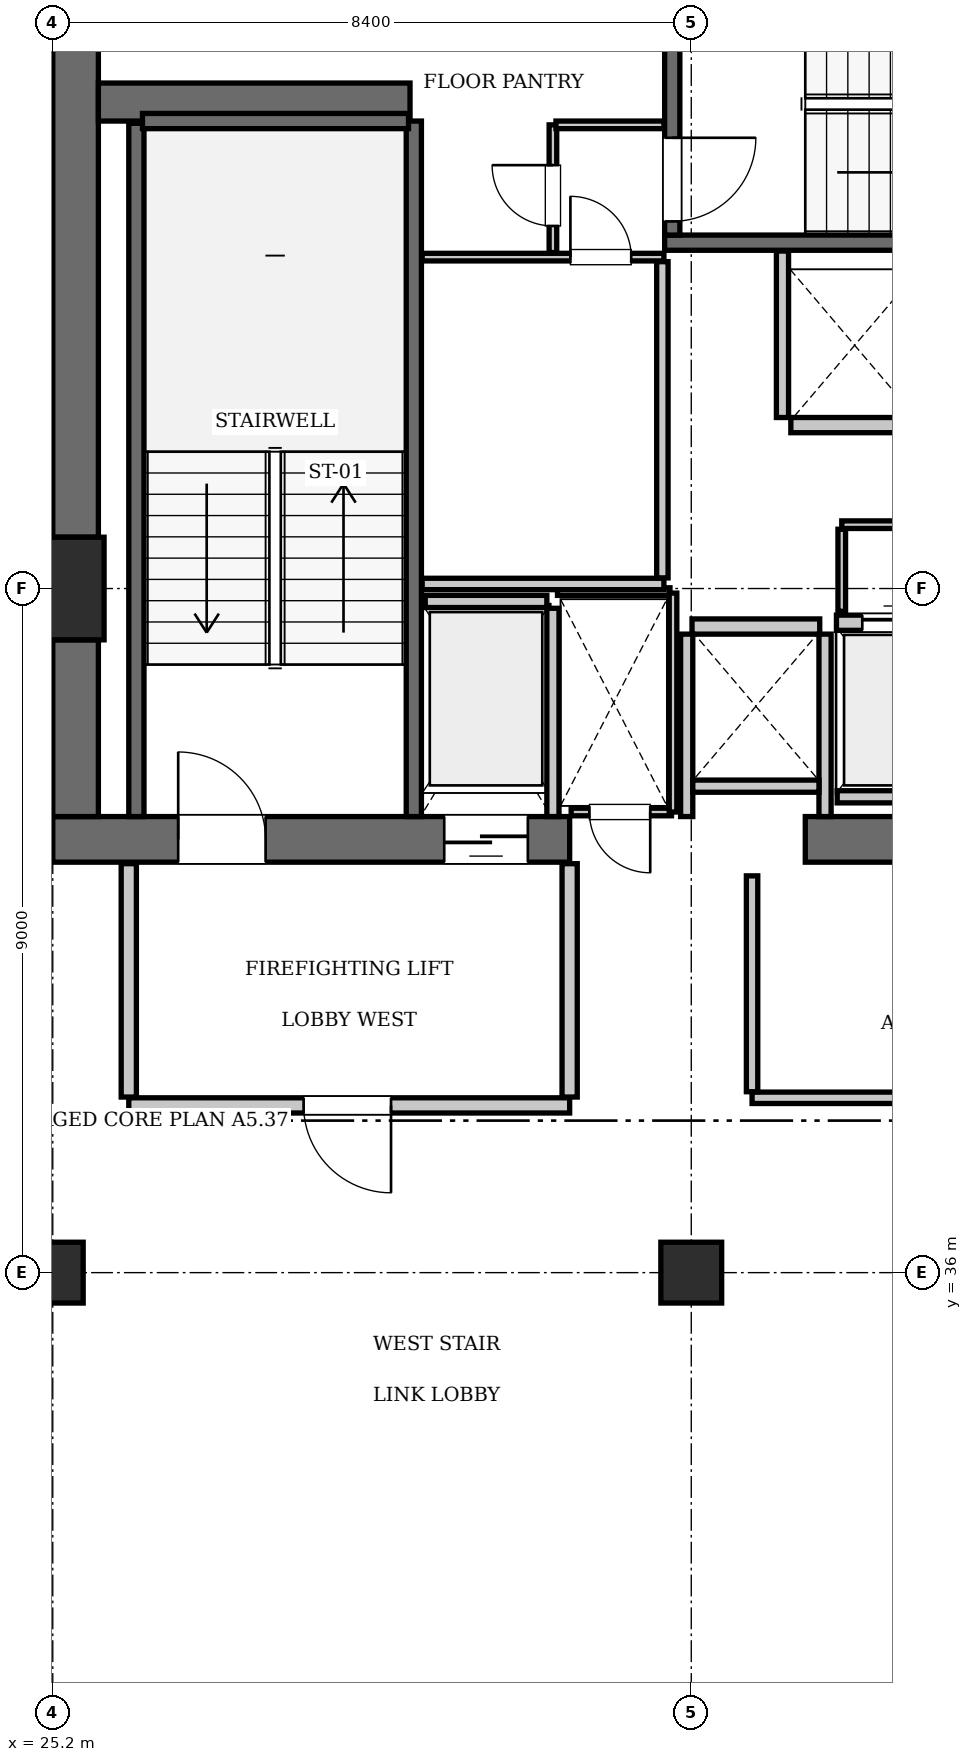
"""IFC4 building model, lengths in metres.
Left out: names, types, materials, properties, quantities, classifications, styles, units other than length and angle.
Written with IfcOpenShell. Run it as: python <this file> out.ifc"""

import sys

from ifc_helpers import new_model, si_unit, direction, frame, frame_2d, origin, origin_2d, place, context, subcontext, project, spatial, rectangle, extrude, element, fill, save


model = new_model("IFC4")
c1 = context("Model", 3, precision=1e-05, world=origin(), true_north=direction((0.0, 1.0)))
c2 = subcontext(c1, "Body", "Model", "MODEL_VIEW")
j1 = project(units=[si_unit("LENGTHUNIT", "METRE"), si_unit("PLANEANGLEUNIT", "RADIAN")], contexts=[c1])
p1 = place(None, origin())
s1 = spatial("IfcSite", under=j1, at=p1, CompositionType="ELEMENT")
p2 = place(p1, origin())
s2 = spatial("IfcBuilding", under=s1, at=p2, CompositionType="ELEMENT")
p3 = place(p2, frame((0.0, 0.0, 341.25)))
s3 = spatial("IfcBuildingStorey", under=s2, at=p3, CompositionType="ELEMENT", Elevation=341.25)
p4 = place(p3, frame((25.2, 45.0, 0.0), z_axis=(0.0, 0.0, 1.0), x_axis=(1.0, 0.0, 0.0)))
e1 = element("IfcColumn", 1, at=p4, inside=s3, PredefinedType="COLUMN", context=c2, shape_type="SweptSolid", body=[
    extrude(rectangle(XDim=1.35, YDim=1.35, at=origin_2d()), origin(), (0.0, 0.0, 1.0), 3.85),
])
p5 = place(p3, frame((25.2, 41.7, 0.0), z_axis=(0.0, 0.0, 1.0), x_axis=(1.0, 0.0, 0.0)))
e2 = element("IfcWall", 2, at=p5, inside=s3, PredefinedType="SHEAR", context=c2, shape_type="SweptSolid", body=[
    extrude(rectangle(XDim=6.8, YDim=0.6, at=frame_2d((3.4, 0.0))), origin(), (0.0, 0.0, 1.0), 3.85),
])
p6 = place(p5, frame((1.65, 0.0, 0.0)))
e3 = element("IfcOpeningElement", 3, at=p6, cuts=e2, PredefinedType="OPENING", context=c2, shape_type="SweptSolid", body=[
    extrude(rectangle(XDim=1.15, YDim=2.15, at=frame_2d((0.575, 1.075))), frame((0.0, 0.31, 0.0), z_axis=(0.0, -1.0, 0.0), x_axis=(1.0, 0.0, 0.0)), (0.0, 0.0, 1.0), 0.62),
])
p7 = place(p5, frame((5.15, 0.0, 0.0)))
e4 = element("IfcOpeningElement", 4, at=p7, cuts=e2, PredefinedType="OPENING", context=c2, shape_type="SweptSolid", body=[
    extrude(rectangle(XDim=1.1, YDim=2.2, at=frame_2d((0.55, 1.1))), frame((0.0, 0.31, 0.0), z_axis=(0.0, -1.0, 0.0), x_axis=(1.0, 0.0, 0.0)), (0.0, 0.0, 1.0), 0.62),
])
p8 = place(p3, frame((35.1, 41.7, 0.0), z_axis=(0.0, 0.0, 1.0), x_axis=(1.0, 0.0, 0.0)))
e5 = element("IfcWall", 5, at=p8, inside=s3, PredefinedType="SHEAR", context=c2, shape_type="SweptSolid", body=[
    extrude(rectangle(XDim=5.4, YDim=0.6, at=frame_2d((2.7, 0.0))), origin(), (0.0, 0.0, 1.0), 3.85),
])
p9 = place(p3, frame((25.5, 42.0, 0.0), z_axis=(0.0, 0.0, 1.0), x_axis=(0.0, 1.0, 0.0)))
e6 = element("IfcWall", 6, at=p9, inside=s3, PredefinedType="SHEAR", context=c2, shape_type="SweptSolid", body=[
    extrude(rectangle(XDim=2.325, YDim=0.6, at=frame_2d((1.163, 0.0))), origin(), (0.0, 0.0, 1.0), 3.85),
])
p10 = place(p3, frame((25.5, 45.675, 0.0), z_axis=(0.0, 0.0, 1.0), x_axis=(0.0, 1.0, 0.0)))
e7 = element("IfcWall", 7, at=p10, inside=s3, PredefinedType="SHEAR", context=c2, shape_type="SweptSolid", body=[
    extrude(rectangle(XDim=7.725, YDim=0.6, at=frame_2d((3.862, 0.0))), origin(), (0.0, 0.0, 1.0), 3.85),
])
p11 = place(p3, frame((25.8, 51.4, 0.0), z_axis=(0.0, 0.0, 1.0), x_axis=(1.0, 0.0, 0.0)))
e8 = element("IfcWall", 8, at=p11, inside=s3, PredefinedType="SHEAR", context=c2, shape_type="SweptSolid", body=[
    extrude(rectangle(XDim=4.1, YDim=0.5, at=frame_2d((2.05, 0.0))), origin(), (0.0, 0.0, 1.0), 3.85),
])
for number, where, z_axis, x_axis in (
    (9, (25.2, 36.0, 0.0), (0.0, 0.0, 1.0), (1.0, 0.0, 0.0)),
    (10, (33.6, 36.0, 0.0), (0.0, 0.0, 1.0), (1.0, 0.0, 0.0)),
):
    element("IfcColumn", number, at=place(p3, frame(where, z_axis=z_axis, x_axis=x_axis)), inside=s3, PredefinedType="COLUMN", context=c2, shape_type="SweptSolid", body=[
        extrude(rectangle(XDim=0.8, YDim=0.8, at=origin_2d()), origin(), (0.0, 0.0, 1.0), 3.85),
    ])
p12 = place(p3, frame((29.95, 42.0, 0.0), z_axis=(0.0, 0.0, 1.0), x_axis=(0.0, 1.0, 0.0)))
e11 = element("IfcWall", 11, at=p12, inside=s3, PredefinedType="SOLIDWALL", context=c2, shape_type="SweptSolid", body=[
    extrude(rectangle(XDim=9.15, YDim=0.2, at=frame_2d((4.575, 0.0))), origin(), (0.0, 0.0, 1.0), 3.61),
])
p13 = place(p3, frame((26.3, 42.0, 0.0), z_axis=(0.0, 0.0, 1.0), x_axis=(0.0, 1.0, 0.0)))
e12 = element("IfcWall", 12, at=p13, inside=s3, PredefinedType="SOLIDWALL", context=c2, shape_type="SweptSolid", body=[
    extrude(rectangle(XDim=9.12, YDim=0.2, at=frame_2d((4.56, 0.0))), origin(), (0.0, 0.0, 1.0), 3.61),
])
p14 = place(p3, frame((26.38, 51.15, 0.0), z_axis=(0.0, 0.0, 1.0), x_axis=(1.0, 0.0, 0.0)))
e13 = element("IfcWall", 13, at=p14, inside=s3, PredefinedType="SOLIDWALL", context=c2, shape_type="SweptSolid", body=[
    extrude(rectangle(XDim=3.5, YDim=0.2, at=frame_2d((1.75, 0.0))), origin(), (0.0, 0.0, 1.0), 3.61),
])
p15 = place(p3, frame((33.25, 49.55, 0.0), z_axis=(0.0, 0.0, 1.0), x_axis=(1.0, 0.0, 0.0)))
e14 = element("IfcWall", 14, at=p15, inside=s3, PredefinedType="SOLIDWALL", context=c2, shape_type="SweptSolid", body=[
    extrude(rectangle(XDim=9.1, YDim=0.2, at=frame_2d((4.55, 0.0))), origin(), (0.0, 0.0, 1.0), 3.61),
])
p16 = place(p3, frame((33.35, 49.65, 0.0), z_axis=(0.0, 0.0, 1.0), x_axis=(0.0, 1.0, 0.0)))
e15 = element("IfcWall", 15, at=p16, inside=s3, PredefinedType="SOLIDWALL", context=c2, shape_type="SweptSolid", body=[
    extrude(rectangle(XDim=3.75, YDim=0.2, at=frame_2d((1.875, 0.0))), origin(), (0.0, 0.0, 1.0), 3.61),
])
p17 = place(p16, frame((0.18, 0.0, 0.0)))
e16 = element("IfcOpeningElement", 16, at=p17, cuts=e15, PredefinedType="OPENING", context=c2, shape_type="SweptSolid", body=[
    extrude(rectangle(XDim=1.1, YDim=2.15, at=frame_2d((0.55, 1.075))), frame((0.0, 0.11, 0.0), z_axis=(0.0, -1.0, 0.0), x_axis=(1.0, 0.0, 0.0)), (0.0, 0.0, 1.0), 0.22),
])
p18 = place(p3, frame((35.51, 44.55, 0.0), z_axis=(0.0, 0.0, 1.0), x_axis=(1.0, 0.0, 0.0)))
e17 = element("IfcWall", 17, at=p18, inside=s3, PredefinedType="SOLIDWALL", context=c2, shape_type="SweptSolid", body=[
    extrude(rectangle(XDim=1.68, YDim=0.2, at=frame_2d((0.84, 0.0))), origin(), (0.0, 0.0, 1.0), 3.61),
])
p19 = place(p18, frame((0.34, 0.0, 0.0)))
e18 = element("IfcOpeningElement", 18, at=p19, cuts=e17, PredefinedType="OPENING", context=c2, shape_type="SweptSolid", body=[
    extrude(rectangle(XDim=1.0, YDim=2.15, at=frame_2d((0.5, 1.075))), frame((0.0, 0.11, 0.0), z_axis=(0.0, -1.0, 0.0), x_axis=(1.0, 0.0, 0.0)), (0.0, 0.0, 1.0), 0.22),
])
p20 = place(p3, frame((34.91, 47.15, 0.0), z_axis=(0.0, 0.0, 1.0), x_axis=(1.0, 0.0, 0.0)))
e19 = element("IfcWall", 19, at=p20, inside=s3, PredefinedType="SOLIDWALL", context=c2, shape_type="SweptSolid", body=[
    extrude(rectangle(XDim=1.68, YDim=0.2, at=frame_2d((0.84, 0.0))), origin(), (0.0, 0.0, 1.0), 3.61),
])
p21 = place(p3, frame((33.61, 44.5, 0.0), z_axis=(0.0, 0.0, 1.0), x_axis=(1.0, 0.0, 0.0)))
e20 = element("IfcWall", 20, at=p21, inside=s3, PredefinedType="SOLIDWALL", context=c2, shape_type="SweptSolid", body=[
    extrude(rectangle(XDim=1.68, YDim=0.2, at=frame_2d((0.84, 0.0))), origin(), (0.0, 0.0, 1.0), 3.61),
])
p22 = place(p3, frame((30.1, 44.83, 0.0), z_axis=(0.0, 0.0, 1.0), x_axis=(1.0, 0.0, 0.0)))
e21 = element("IfcWall", 21, at=p22, inside=s3, PredefinedType="SOLIDWALL", context=c2, shape_type="SweptSolid", body=[
    extrude(rectangle(XDim=1.6, YDim=0.16, at=frame_2d((0.8, 0.0))), origin(), (0.0, 0.0, 1.0), 3.61),
])
p23 = place(p3, frame((31.78, 42.0, 0.0), z_axis=(0.0, 0.0, 1.0), x_axis=(0.0, 1.0, 0.0)))
e22 = element("IfcWall", 22, at=p23, inside=s3, PredefinedType="SOLIDWALL", context=c2, shape_type="SweptSolid", body=[
    extrude(rectangle(XDim=2.74, YDim=0.16, at=frame_2d((1.37, 0.0))), origin(), (0.0, 0.0, 1.0), 3.61),
])
p24 = place(p3, frame((35.52, 42.26, 0.0), z_axis=(0.0, 0.0, 1.0), x_axis=(1.0, 0.0, 0.0)))
e23 = element("IfcWall", 23, at=p24, inside=s3, PredefinedType="SOLIDWALL", context=c2, shape_type="SweptSolid", body=[
    extrude(rectangle(XDim=5.02, YDim=0.16, at=frame_2d((2.51, 0.0))), origin(), (0.0, 0.0, 1.0), 3.61),
])
p25 = place(p3, frame((34.8, 47.25, 0.0), z_axis=(0.0, 0.0, 1.0), x_axis=(0.0, 1.0, 0.0)))
e24 = element("IfcWall", 24, at=p25, inside=s3, PredefinedType="SOLIDWALL", context=c2, shape_type="SweptSolid", body=[
    extrude(rectangle(XDim=2.19, YDim=0.16, at=frame_2d((1.095, 0.0))), origin(), (0.0, 0.0, 1.0), 3.61),
])
for number, where, z_axis, x_axis in (
    (25, (33.54, 42.0, 0.0), (0.0, 0.0, 1.0), (0.0, 1.0, 0.0)),
    (26, (35.36, 42.0, 0.0), (0.0, 0.0, 1.0), (0.0, 1.0, 0.0)),
):
    element("IfcWall", number, at=place(p3, frame(where, z_axis=z_axis, x_axis=x_axis)), inside=s3, PredefinedType="SOLIDWALL", context=c2, shape_type="SweptSolid", body=[
        extrude(rectangle(XDim=2.4, YDim=0.16, at=frame_2d((1.2, 0.0))), origin(), (0.0, 0.0, 1.0), 3.61),
    ])
p26 = place(p3, frame((33.62, 42.4, 0.0), z_axis=(0.0, 0.0, 1.0), x_axis=(1.0, 0.0, 0.0)))
e27 = element("IfcWall", 27, at=p26, inside=s3, PredefinedType="SOLIDWALL", context=c2, shape_type="SweptSolid", body=[
    extrude(rectangle(XDim=1.66, YDim=0.16, at=frame_2d((0.83, 0.0))), origin(), (0.0, 0.0, 1.0), 3.61),
])
p27 = place(p3, frame((26.2, 38.2, 0.0), z_axis=(0.0, 0.0, 1.0), x_axis=(1.0, 0.0, 0.0)))
e28 = element("IfcWall", 28, at=p27, inside=s3, PredefinedType="PARTITIONING", context=c2, shape_type="SweptSolid", body=[
    extrude(rectangle(XDim=5.8, YDim=0.2, at=frame_2d((2.9, 0.0))), origin(), (0.0, 0.0, 1.0), 3.61),
])
p28 = place(p27, frame((2.3, 0.0, 0.0)))
e29 = element("IfcOpeningElement", 29, at=p28, cuts=e28, PredefinedType="OPENING", context=c2, shape_type="SweptSolid", body=[
    extrude(rectangle(XDim=1.15, YDim=2.15, at=frame_2d((0.575, 1.075))), frame((0.0, 0.11, 0.0), z_axis=(0.0, -1.0, 0.0), x_axis=(1.0, 0.0, 0.0)), (0.0, 0.0, 1.0), 0.22),
])
for number, where, z_axis, x_axis in (
    (30, (26.2, 38.31, 0.0), (0.0, 0.0, 1.0), (0.0, 1.0, 0.0)),
    (31, (32.0, 38.31, 0.0), (0.0, 0.0, 1.0), (0.0, 1.0, 0.0)),
):
    element("IfcWall", number, at=place(p3, frame(where, z_axis=z_axis, x_axis=x_axis)), inside=s3, PredefinedType="PARTITIONING", context=c2, shape_type="SweptSolid", body=[
        extrude(rectangle(XDim=3.07, YDim=0.2, at=frame_2d((1.535, 0.0))), origin(), (0.0, 0.0, 1.0), 3.61),
    ])
p29 = place(p3, frame((32.02, 42.06, 0.0), z_axis=(0.0, 0.0, 1.0), x_axis=(1.0, 0.0, 0.0)))
e32 = element("IfcWall", 32, at=p29, inside=s3, PredefinedType="PARTITIONING", context=c2, shape_type="SweptSolid", body=[
    extrude(rectangle(XDim=1.32, YDim=0.1, at=frame_2d((0.66, 0.0))), origin(), (0.0, 0.0, 1.0), 3.61),
])
p30 = place(p29, frame((0.24, 0.0, 0.0)))
e33 = element("IfcOpeningElement", 33, at=p30, cuts=e32, PredefinedType="OPENING", context=c2, shape_type="SweptSolid", body=[
    extrude(rectangle(XDim=0.8, YDim=2.05, at=frame_2d((0.4, 1.025))), frame((0.0, 0.06, 0.0), z_axis=(0.0, -1.0, 0.0), x_axis=(1.0, 0.0, 0.0)), (0.0, 0.0, 1.0), 0.12),
])
p31 = place(p3, frame((31.84, 44.96, 0.0), z_axis=(0.0, 0.0, 1.0), x_axis=(1.0, 0.0, 0.0)))
e34 = element("IfcWall", 34, at=p31, inside=s3, PredefinedType="PARTITIONING", context=c2, shape_type="SweptSolid", body=[
    extrude(rectangle(XDim=1.48, YDim=0.1, at=frame_2d((0.74, 0.0))), origin(), (0.0, 0.0, 1.0), 3.61),
])
p32 = place(p3, frame((33.36, 42.06, 0.0), z_axis=(0.0, 0.0, 1.0), x_axis=(0.0, 1.0, 0.0)))
e35 = element("IfcWall", 35, at=p32, inside=s3, PredefinedType="PARTITIONING", context=c2, shape_type="SweptSolid", body=[
    extrude(rectangle(XDim=2.88, YDim=0.1, at=frame_2d((1.44, 0.0))), origin(), (0.0, 0.0, 1.0), 3.61),
])
p33 = place(p3, frame((35.58, 45.84, 0.0), z_axis=(0.0, 0.0, 1.0), x_axis=(1.0, 0.0, 0.0)))
e36 = element("IfcWall", 36, at=p33, inside=s3, PredefinedType="PARTITIONING", context=c2, shape_type="SweptSolid", body=[
    extrude(rectangle(XDim=4.94, YDim=0.1, at=frame_2d((2.47, 0.0))), origin(), (0.0, 0.0, 1.0), 3.61),
])
p34 = place(p33, frame((1.8, 0.0, 0.0)))
e37 = element("IfcOpeningElement", 37, at=p34, cuts=e36, PredefinedType="OPENING", context=c2, shape_type="SweptSolid", body=[
    extrude(rectangle(XDim=0.8, YDim=2.05, at=frame_2d((0.4, 1.025))), frame((0.0, 0.06, 0.0), z_axis=(0.0, -1.0, 0.0), x_axis=(1.0, 0.0, 0.0)), (0.0, 0.0, 1.0), 0.12),
])
p35 = place(p3, frame((35.58, 44.7, 0.0), z_axis=(0.0, 0.0, 1.0), x_axis=(0.0, 1.0, 0.0)))
e38 = element("IfcWall", 38, at=p35, inside=s3, PredefinedType="PARTITIONING", context=c2, shape_type="SweptSolid", body=[
    extrude(rectangle(XDim=1.08, YDim=0.1, at=frame_2d((0.54, 0.0))), origin(), (0.0, 0.0, 1.0), 3.61),
])
p36 = place(p3, frame((30.06, 45.06, 0.0), z_axis=(0.0, 0.0, 1.0), x_axis=(1.0, 0.0, 0.0)))
e39 = element("IfcWall", 39, at=p36, inside=s3, PredefinedType="PARTITIONING", context=c2, shape_type="SweptSolid", body=[
    extrude(rectangle(XDim=3.18, YDim=0.15, at=frame_2d((1.59, 0.0))), origin(), (0.0, 0.0, 1.0), 3.61),
])
p37 = place(p3, frame((33.22, 45.14, 0.0), z_axis=(0.0, 0.0, 1.0), x_axis=(0.0, 1.0, 0.0)))
e40 = element("IfcWall", 40, at=p37, inside=s3, PredefinedType="PARTITIONING", context=c2, shape_type="SweptSolid", body=[
    extrude(rectangle(XDim=4.16, YDim=0.15, at=frame_2d((2.08, 0.0))), origin(), (0.0, 0.0, 1.0), 3.61),
])
p38 = place(p3, frame((30.06, 49.36, 0.0), z_axis=(0.0, 0.0, 1.0), x_axis=(1.0, 0.0, 0.0)))
e41 = element("IfcWall", 41, at=p38, inside=s3, PredefinedType="PARTITIONING", context=c2, shape_type="SweptSolid", body=[
    extrude(rectangle(XDim=3.18, YDim=0.1, at=frame_2d((1.59, 0.0))), origin(), (0.0, 0.0, 1.0), 3.61),
])
p39 = place(p38, frame((1.95, 0.0, 0.0)))
e42 = element("IfcOpeningElement", 42, at=p39, cuts=e41, PredefinedType="OPENING", context=c2, shape_type="SweptSolid", body=[
    extrude(rectangle(XDim=0.8, YDim=2.05, at=frame_2d((0.4, 1.025))), frame((0.0, 0.06, 0.0), z_axis=(0.0, -1.0, 0.0), x_axis=(1.0, 0.0, 0.0)), (0.0, 0.0, 1.0), 0.12),
])
p40 = place(p3, frame((31.78, 49.42, 0.0), z_axis=(0.0, 0.0, 1.0), x_axis=(0.0, 1.0, 0.0)))
e43 = element("IfcWall", 43, at=p40, inside=s3, PredefinedType="PARTITIONING", context=c2, shape_type="SweptSolid", body=[
    extrude(rectangle(XDim=1.68, YDim=0.1, at=frame_2d((0.84, 0.0))), origin(), (0.0, 0.0, 1.0), 3.61),
])
p41 = place(p40, frame((0.35, 0.0, 0.0)))
e44 = element("IfcOpeningElement", 44, at=p41, cuts=e43, PredefinedType="OPENING", context=c2, shape_type="SweptSolid", body=[
    extrude(rectangle(XDim=0.8, YDim=2.05, at=frame_2d((0.4, 1.025))), frame((0.0, 0.06, 0.0), z_axis=(0.0, -1.0, 0.0), x_axis=(1.0, 0.0, 0.0)), (0.0, 0.0, 1.0), 0.12),
])
p42 = place(p3, frame((31.82, 51.1, 0.0), z_axis=(0.0, 0.0, 1.0), x_axis=(1.0, 0.0, 0.0)))
e45 = element("IfcWall", 45, at=p42, inside=s3, PredefinedType="PARTITIONING", context=c2, shape_type="SweptSolid", body=[
    extrude(rectangle(XDim=1.42, YDim=0.1, at=frame_2d((0.71, 0.0))), origin(), (0.0, 0.0, 1.0), 3.61),
])
p43 = place(p3, frame((34.4, 38.3, 0.0), z_axis=(0.0, 0.0, 1.0), x_axis=(1.0, 0.0, 0.0)))
e46 = element("IfcWall", 46, at=p43, inside=s3, PredefinedType="PARTITIONING", context=c2, shape_type="SweptSolid", body=[
    extrude(rectangle(XDim=5.92, YDim=0.15, at=frame_2d((2.96, 0.0))), origin(), (0.0, 0.0, 1.0), 3.61),
])
p44 = place(p43, frame((2.4, 0.0, 0.0)))
e47 = element("IfcOpeningElement", 47, at=p44, cuts=e46, PredefinedType="OPENING", context=c2, shape_type="SweptSolid", body=[
    extrude(rectangle(XDim=0.9, YDim=2.1, at=frame_2d((0.45, 1.05))), frame((0.0, 0.085, 0.0), z_axis=(0.0, -1.0, 0.0), x_axis=(1.0, 0.0, 0.0)), (0.0, 0.0, 1.0), 0.17),
])
p45 = place(p3, frame((34.4, 38.38, 0.0), z_axis=(0.0, 0.0, 1.0), x_axis=(0.0, 1.0, 0.0)))
e48 = element("IfcWall", 48, at=p45, inside=s3, PredefinedType="PARTITIONING", context=c2, shape_type="SweptSolid", body=[
    extrude(rectangle(XDim=2.84, YDim=0.15, at=frame_2d((1.42, 0.0))), origin(), (0.0, 0.0, 1.0), 3.61),
])
p46 = place(p6, origin())
e49 = element("IfcDoor", 49, at=p46, inside=s3, OperationType="SINGLE_SWING_LEFT", PredefinedType="DOOR", context=c2, shape_type="SweptSolid", body=[
    extrude(rectangle(XDim=1.15, YDim=2.15, at=frame_2d((0.575, 1.075))), frame((0.0, 0.025, 0.0), z_axis=(0.0, -1.0, 0.0), x_axis=(1.0, 0.0, 0.0)), (0.0, 0.0, 1.0), 0.05),
])
fill(e3, e49)
p47 = place(p17, frame((1.1, 0.0, 0.0), z_axis=(0.0, 0.0, 1.0), x_axis=(-1.0, 0.0, 0.0)))
e50 = element("IfcDoor", 50, at=p47, inside=s3, OperationType="SINGLE_SWING_LEFT", PredefinedType="DOOR", context=c2, shape_type="SweptSolid", body=[
    extrude(rectangle(XDim=1.1, YDim=2.15, at=frame_2d((0.55, 1.075))), frame((0.0, 0.025, 0.0), z_axis=(0.0, -1.0, 0.0), x_axis=(1.0, 0.0, 0.0)), (0.0, 0.0, 1.0), 0.05),
])
fill(e16, e50)
p48 = place(p19, origin())
e51 = element("IfcDoor", 51, at=p48, inside=s3, OperationType="SLIDING_TO_LEFT", PredefinedType="DOOR", context=c2, shape_type="SweptSolid", body=[
    extrude(rectangle(XDim=1.0, YDim=2.15, at=frame_2d((0.5, 1.075))), frame((0.0, 0.025, 0.0), z_axis=(0.0, -1.0, 0.0), x_axis=(1.0, 0.0, 0.0)), (0.0, 0.0, 1.0), 0.05),
])
fill(e18, e51)
p49 = place(p7, frame((1.1, 0.0, 0.0), z_axis=(0.0, 0.0, 1.0), x_axis=(-1.0, 0.0, 0.0)))
e52 = element("IfcDoor", 52, at=p49, inside=s3, OperationType="SLIDING_TO_LEFT", PredefinedType="DOOR", context=c2, shape_type="SweptSolid", body=[
    extrude(rectangle(XDim=1.1, YDim=2.2, at=frame_2d((0.55, 1.1))), frame((0.0, 0.025, 0.0), z_axis=(0.0, -1.0, 0.0), x_axis=(1.0, 0.0, 0.0)), (0.0, 0.0, 1.0), 0.05),
])
fill(e4, e52)
p50 = place(p28, frame((1.15, 0.0, 0.0), z_axis=(0.0, 0.0, 1.0), x_axis=(-1.0, 0.0, 0.0)))
e53 = element("IfcDoor", 53, at=p50, inside=s3, OperationType="SINGLE_SWING_LEFT", PredefinedType="DOOR", context=c2, shape_type="SweptSolid", body=[
    extrude(rectangle(XDim=1.15, YDim=2.15, at=frame_2d((0.575, 1.075))), frame((0.0, 0.025, 0.0), z_axis=(0.0, -1.0, 0.0), x_axis=(1.0, 0.0, 0.0)), (0.0, 0.0, 1.0), 0.05),
])
fill(e29, e53)
p51 = place(p30, frame((0.8, 0.0, 0.0), z_axis=(0.0, 0.0, 1.0), x_axis=(-1.0, 0.0, 0.0)))
e54 = element("IfcDoor", 54, at=p51, inside=s3, OperationType="SINGLE_SWING_LEFT", PredefinedType="DOOR", context=c2, shape_type="SweptSolid", body=[
    extrude(rectangle(XDim=0.8, YDim=2.05, at=frame_2d((0.4, 1.025))), frame((0.0, 0.025, 0.0), z_axis=(0.0, -1.0, 0.0), x_axis=(1.0, 0.0, 0.0)), (0.0, 0.0, 1.0), 0.05),
])
fill(e33, e54)
p52 = place(p39, origin())
e55 = element("IfcDoor", 55, at=p52, inside=s3, OperationType="SINGLE_SWING_LEFT", PredefinedType="DOOR", context=c2, shape_type="SweptSolid", body=[
    extrude(rectangle(XDim=0.8, YDim=2.05, at=frame_2d((0.4, 1.025))), frame((0.0, 0.025, 0.0), z_axis=(0.0, -1.0, 0.0), x_axis=(1.0, 0.0, 0.0)), (0.0, 0.0, 1.0), 0.05),
])
fill(e42, e55)
p53 = place(p41, origin())
e56 = element("IfcDoor", 56, at=p53, inside=s3, OperationType="SINGLE_SWING_RIGHT", PredefinedType="DOOR", context=c2, shape_type="SweptSolid", body=[
    extrude(rectangle(XDim=0.8, YDim=2.05, at=frame_2d((0.4, 1.025))), frame((0.0, 0.025, 0.0), z_axis=(0.0, -1.0, 0.0), x_axis=(1.0, 0.0, 0.0)), (0.0, 0.0, 1.0), 0.05),
])
fill(e44, e56)
save(model, sys.argv[1])
